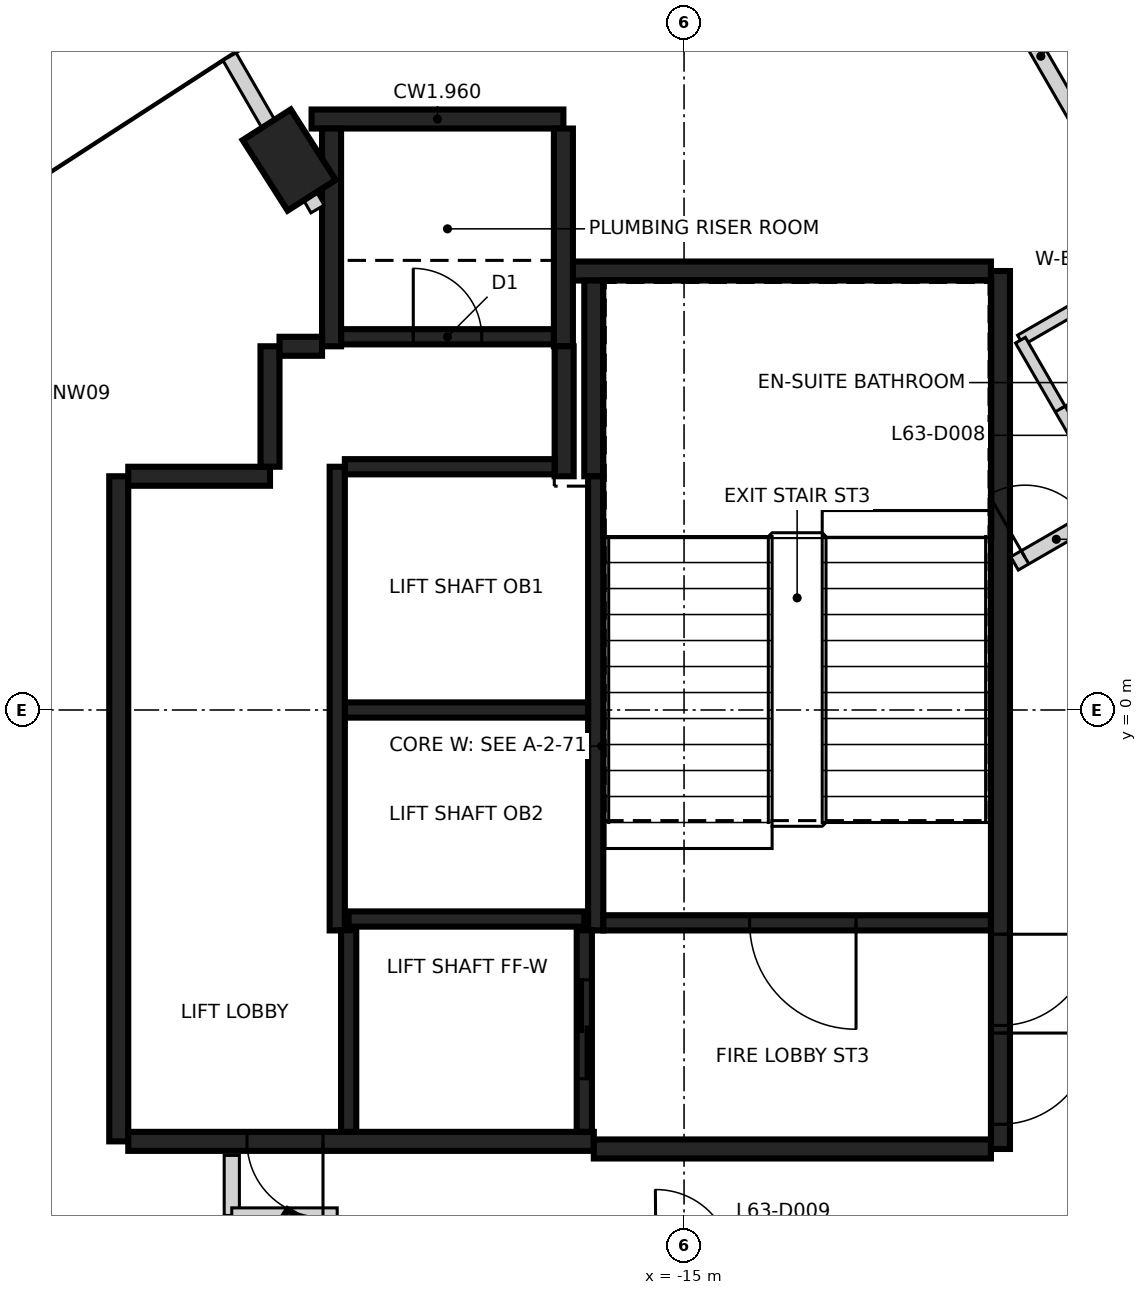
"""IFC4 building model, lengths in metres.
Left out: names, types, materials, properties, quantities, classifications, styles, units other than length and angle.
Written with IfcOpenShell. Run it as: python <this file> out.ifc"""

import sys

from ifc_helpers import new_model, si_unit, direction, frame, frame_2d, origin, origin_2d, place, context, subcontext, project, spatial, rectangle, extrude, element, fill, save


model = new_model("IFC4")
c1 = context("Model", 3, precision=1e-05, world=origin(), true_north=direction((0.0, 1.0)))
c2 = subcontext(c1, "Body", "Model", "MODEL_VIEW")
j1 = project(units=[si_unit("LENGTHUNIT", "METRE"), si_unit("PLANEANGLEUNIT", "RADIAN")], contexts=[c1])
p1 = place(None, origin())
s1 = spatial("IfcSite", under=j1, at=p1, CompositionType="ELEMENT")
p2 = place(p1, origin())
s2 = spatial("IfcBuilding", under=s1, at=p2, CompositionType="ELEMENT")
p3 = place(p2, frame((0.0, 0.0, 250.2)))
s3 = spatial("IfcBuildingStorey", under=s2, at=p3, CompositionType="ELEMENT", Elevation=250.2)
for number, where, z_axis, x_axis in (
    (1, (-20.195, 7.235, -0.35), (0.0, 0.0, 1.0), (-0.538, 0.843, 0.0)),
    (2, (-20.195, -7.235, -0.35), (0.0, 0.0, 1.0), (0.538, 0.843, 0.0)),
):
    element("IfcColumn", number, at=place(p3, frame(where, z_axis=z_axis, x_axis=x_axis)), inside=s3, PredefinedType="COLUMN", context=c2, shape_type="SweptSolid", body=[
        extrude(rectangle(XDim=1.1, YDim=0.75, at=origin_2d()), origin(), (0.0, 0.0, 1.0), 3.6),
    ])
p4 = place(p3, frame((-10.837, 5.775, 0.0), z_axis=(0.0, 0.0, 1.0), x_axis=(0.0, -1.0, 0.0)))
e3 = element("IfcWall", 3, at=p4, inside=s3, PredefinedType="SHEAR", context=c2, shape_type="SweptSolid", body=[
    extrude(rectangle(XDim=11.55, YDim=0.25, at=frame_2d((5.775, 0.0))), origin(), (0.0, 0.0, 1.0), 3.25),
])
p5 = place(p4, frame((10.025, 0.0, 0.0)))
e4 = element("IfcOpeningElement", 4, at=p5, cuts=e3, PredefinedType="OPENING", context=c2, shape_type="SweptSolid", body=[
    extrude(rectangle(XDim=1.2, YDim=2.1, at=frame_2d((0.6, 1.05))), frame((0.0, 0.135, 0.0), z_axis=(0.0, -1.0, 0.0), x_axis=(1.0, 0.0, 0.0)), (0.0, 0.0, 1.0), 0.27),
])
p6 = place(p4, frame((8.725, 0.0, 0.0)))
e5 = element("IfcOpeningElement", 5, at=p6, cuts=e3, PredefinedType="OPENING", context=c2, shape_type="SweptSolid", body=[
    extrude(rectangle(XDim=1.2, YDim=2.1, at=frame_2d((0.6, 1.05))), frame((0.0, 0.135, 0.0), z_axis=(0.0, -1.0, 0.0), x_axis=(1.0, 0.0, 0.0)), (0.0, 0.0, 1.0), 0.27),
])
p7 = place(p3, frame((-22.437, -5.675, 0.0), z_axis=(0.0, 0.0, 1.0), x_axis=(0.0, 1.0, 0.0)))
e6 = element("IfcWall", 6, at=p7, inside=s3, PredefinedType="SHEAR", context=c2, shape_type="SweptSolid", body=[
    extrude(rectangle(XDim=8.75, YDim=0.25, at=frame_2d((4.375, 0.0))), origin(), (0.0, 0.0, 1.0), 3.25),
])
p8 = place(p3, frame((-16.187, -5.675, 0.0), z_axis=(0.0, 0.0, 1.0), x_axis=(-1.0, 0.0, 0.0)))
e7 = element("IfcWall", 7, at=p8, inside=s3, PredefinedType="SHEAR", context=c2, shape_type="SweptSolid", body=[
    extrude(rectangle(XDim=6.125, YDim=0.25, at=frame_2d((3.062, 0.0))), origin(), (0.0, 0.0, 1.0), 3.25),
])
p9 = place(p8, frame((3.563, 0.0, 0.0)))
e8 = element("IfcOpeningElement", 8, at=p9, cuts=e7, PredefinedType="OPENING", context=c2, shape_type="SweptSolid", body=[
    extrude(rectangle(XDim=1.0, YDim=2.1, at=frame_2d((0.5, 1.05))), frame((0.0, 0.135, 0.0), z_axis=(0.0, -1.0, 0.0), x_axis=(1.0, 0.0, 0.0)), (0.0, 0.0, 1.0), 0.27),
])
p10 = place(p3, frame((-10.963, -5.775, 0.0), z_axis=(0.0, 0.0, 1.0), x_axis=(-1.0, 0.0, 0.0)))
e9 = element("IfcWall", 9, at=p10, inside=s3, PredefinedType="SHEAR", context=c2, shape_type="SweptSolid", body=[
    extrude(rectangle(XDim=5.225, YDim=0.25, at=frame_2d((2.612, 0.0))), origin(), (0.0, 0.0, 1.0), 3.25),
])
p11 = place(p3, frame((-16.472, 5.775, 0.0), z_axis=(0.0, 0.0, 1.0), x_axis=(1.0, 0.0, 0.0)))
e10 = element("IfcWall", 10, at=p11, inside=s3, PredefinedType="SHEAR", context=c2, shape_type="SweptSolid", body=[
    extrude(rectangle(XDim=5.51, YDim=0.25, at=frame_2d((2.755, 0.0))), origin(), (0.0, 0.0, 1.0), 3.25),
])
p12 = place(p3, frame((-19.9, 7.775, 0.0), z_axis=(0.0, 0.0, 1.0), x_axis=(1.0, 0.0, 0.0)))
e11 = element("IfcWall", 11, at=p12, inside=s3, PredefinedType="SHEAR", context=c2, shape_type="SweptSolid", body=[
    extrude(rectangle(XDim=3.313, YDim=0.25, at=frame_2d((1.656, 0.0))), origin(), (0.0, 0.0, 1.0), 3.25),
])
for number, where, z_axis, x_axis in (
    (12, (-16.587, 7.65, 0.0), (0.0, 0.0, 1.0), (0.0, -1.0, 0.0)),
    (13, (-19.637, 4.785, 0.0), (0.0, 0.0, 1.0), (0.0, 1.0, 0.0)),
):
    element("IfcWall", number, at=place(p3, frame(where, z_axis=z_axis, x_axis=x_axis)), inside=s3, PredefinedType="SHEAR", context=c2, shape_type="SweptSolid", body=[
        extrude(rectangle(XDim=2.865, YDim=0.25, at=frame_2d((1.432, 0.0))), origin(), (0.0, 0.0, 1.0), 3.25),
    ])
p13 = place(p3, frame((-16.187, 3.075, 0.0), z_axis=(0.0, 0.0, 1.0), x_axis=(0.0, 1.0, 0.0)))
e14 = element("IfcWall", 14, at=p13, inside=s3, PredefinedType="SHEAR", context=c2, shape_type="SweptSolid", body=[
    extrude(rectangle(XDim=2.575, YDim=0.25, at=frame_2d((1.287, 0.0))), origin(), (0.0, 0.0, 1.0), 3.25),
])
p14 = place(p3, frame((-22.312, 3.075, 0.0), z_axis=(0.0, 0.0, 1.0), x_axis=(1.0, 0.0, 0.0)))
e15 = element("IfcWall", 15, at=p14, inside=s3, PredefinedType="SHEAR", context=c2, shape_type="SweptSolid", body=[
    extrude(rectangle(XDim=1.865, YDim=0.25, at=frame_2d((0.932, 0.0))), origin(), (0.0, 0.0, 1.0), 3.25),
])
p15 = place(p3, frame((-16.577, 4.785, 0.0), z_axis=(0.0, 0.0, 1.0), x_axis=(0.0, -1.0, 0.0)))
e16 = element("IfcWall", 16, at=p15, inside=s3, PredefinedType="SHEAR", context=c2, shape_type="SweptSolid", body=[
    extrude(rectangle(XDim=1.71, YDim=0.25, at=frame_2d((0.855, 0.0))), origin(), (0.0, 0.0, 1.0), 3.25),
])
p16 = place(p3, frame((-20.447, 3.2, 0.0), z_axis=(0.0, 0.0, 1.0), x_axis=(0.0, 1.0, 0.0)))
e17 = element("IfcWall", 17, at=p16, inside=s3, PredefinedType="SHEAR", context=c2, shape_type="SweptSolid", body=[
    extrude(rectangle(XDim=1.584, YDim=0.25, at=frame_2d((0.792, 0.0))), origin(), (0.0, 0.0, 1.0), 3.25),
])
p17 = place(p3, frame((-20.322, 4.785, 0.0), z_axis=(0.0, 0.0, 1.0), x_axis=(1.0, 0.0, 0.0)))
e18 = element("IfcWall", 18, at=p17, inside=s3, PredefinedType="SHEAR", context=c2, shape_type="SweptSolid", body=[
    extrude(rectangle(XDim=0.559, YDim=0.25, at=frame_2d((0.28, 0.0))), origin(), (0.0, 0.0, 1.0), 3.25),
])
p18 = place(p3, frame((-16.162, 3.074, 0.0), z_axis=(0.0, 0.0, 1.0), x_axis=(0.0, -1.0, 0.0)))
e19 = element("IfcWall", 19, at=p18, inside=s3, PredefinedType="SHEAR", context=c2, shape_type="SweptSolid", body=[
    extrude(rectangle(XDim=5.974, YDim=0.2, at=frame_2d((2.987, 0.0))), origin(), (0.0, 0.0, 1.0), 3.25),
])
p19 = place(p3, frame((-19.562, -2.9, 0.0), z_axis=(0.0, 0.0, 1.0), x_axis=(0.0, 1.0, 0.0)))
e20 = element("IfcWall", 20, at=p19, inside=s3, PredefinedType="SHEAR", context=c2, shape_type="SweptSolid", body=[
    extrude(rectangle(XDim=6.1, YDim=0.2, at=frame_2d((3.05, 0.0))), origin(), (0.0, 0.0, 1.0), 3.25),
])
p20 = place(p3, frame((-10.963, -2.8, 0.0), z_axis=(0.0, 0.0, 1.0), x_axis=(-1.0, 0.0, 0.0)))
e21 = element("IfcWall", 21, at=p20, inside=s3, PredefinedType="SHEAR", context=c2, shape_type="SweptSolid", body=[
    extrude(rectangle(XDim=5.098, YDim=0.2, at=frame_2d((2.549, 0.0))), origin(), (0.0, 0.0, 1.0), 3.25),
])
p21 = place(p20, frame((1.774, 0.0, 0.0)))
e22 = element("IfcOpeningElement", 22, at=p21, cuts=e21, PredefinedType="OPENING", context=c2, shape_type="SweptSolid", body=[
    extrude(rectangle(XDim=1.4, YDim=2.1, at=frame_2d((0.7, 1.05))), frame((0.0, 0.11, 0.0), z_axis=(0.0, -1.0, 0.0), x_axis=(1.0, 0.0, 0.0)), (0.0, 0.0, 1.0), 0.22),
])
p22 = place(p3, frame((-16.263, 0.0, 0.0), z_axis=(0.0, 0.0, 1.0), x_axis=(-1.0, 0.0, 0.0)))
e23 = element("IfcWall", 23, at=p22, inside=s3, PredefinedType="SHEAR", context=c2, shape_type="SweptSolid", body=[
    extrude(rectangle(XDim=3.198, YDim=0.2, at=frame_2d((1.599, 0.0))), origin(), (0.0, 0.0, 1.0), 3.25),
])
p23 = place(p3, frame((-19.511, 4.91, 0.0), z_axis=(0.0, 0.0, 1.0), x_axis=(1.0, 0.0, 0.0)))
e24 = element("IfcWall", 24, at=p23, inside=s3, PredefinedType="SHEAR", context=c2, shape_type="SweptSolid", body=[
    extrude(rectangle(XDim=2.798, YDim=0.2, at=frame_2d((1.399, 0.0))), origin(), (0.0, 0.0, 1.0), 3.25),
])
p24 = place(p23, frame((0.949, 0.0, 0.0)))
e25 = element("IfcOpeningElement", 25, at=p24, cuts=e24, PredefinedType="OPENING", context=c2, shape_type="SweptSolid", body=[
    extrude(rectangle(XDim=0.9, YDim=2.1, at=frame_2d((0.45, 1.05))), frame((0.0, 0.11, 0.0), z_axis=(0.0, -1.0, 0.0), x_axis=(1.0, 0.0, 0.0)), (0.0, 0.0, 1.0), 0.22),
])
p25 = place(p3, frame((-19.462, 3.2, 0.0), z_axis=(0.0, 0.0, 1.0), x_axis=(1.0, 0.0, 0.0)))
e26 = element("IfcWall", 26, at=p25, inside=s3, PredefinedType="SHEAR", context=c2, shape_type="SweptSolid", body=[
    extrude(rectangle(XDim=2.759, YDim=0.2, at=frame_2d((1.379, 0.0))), origin(), (0.0, 0.0, 1.0), 3.25),
])
p26 = place(p3, frame((-19.412, -2.75, 0.0), z_axis=(0.0, 0.0, 1.0), x_axis=(1.0, 0.0, 0.0)))
e27 = element("IfcWall", 27, at=p26, inside=s3, PredefinedType="SHEAR", context=c2, shape_type="SweptSolid", body=[
    extrude(rectangle(XDim=3.1, YDim=0.2, at=frame_2d((1.55, 0.0))), origin(), (0.0, 0.0, 1.0), 3.25),
])
p27 = place(p3, frame((-16.312, -2.898, 0.0), z_axis=(0.0, 0.0, 1.0), x_axis=(0.0, -1.0, 0.0)))
e28 = element("IfcWall", 28, at=p27, inside=s3, PredefinedType="SHEAR", context=c2, shape_type="SweptSolid", body=[
    extrude(rectangle(XDim=2.651, YDim=0.2, at=frame_2d((1.325, 0.0))), origin(), (0.0, 0.0, 1.0), 3.25),
])
p28 = place(p27, frame((0.652, 0.0, 0.0)))
e29 = element("IfcOpeningElement", 29, at=p28, cuts=e28, PredefinedType="OPENING", context=c2, shape_type="SweptSolid", body=[
    extrude(rectangle(XDim=1.3, YDim=2.1, at=frame_2d((0.65, 1.05))), frame((0.0, 0.11, 0.0), z_axis=(0.0, -1.0, 0.0), x_axis=(1.0, 0.0, 0.0)), (0.0, 0.0, 1.0), 0.22),
])
p29 = place(p3, frame((-19.412, -5.549, 0.0), z_axis=(0.0, 0.0, 1.0), x_axis=(0.0, 1.0, 0.0)))
e30 = element("IfcWall", 30, at=p29, inside=s3, PredefinedType="SHEAR", context=c2, shape_type="SweptSolid", body=[
    extrude(rectangle(XDim=2.651, YDim=0.2, at=frame_2d((1.325, 0.0))), origin(), (0.0, 0.0, 1.0), 3.25),
])
p30 = place(p3, frame((-20.95, -6.65, 0.0), z_axis=(0.0, 0.0, 1.0), x_axis=(0.0, 1.0, 0.0)))
e31 = element("IfcWall", 31, at=p30, inside=s3, PredefinedType="PARTITIONING", context=c2, shape_type="SweptSolid", body=[
    extrude(rectangle(XDim=0.79, YDim=0.2, at=frame_2d((0.395, 0.0))), origin(), (0.0, 0.0, 1.0), 2.35),
])
p31 = place(p3, frame((-20.95, -6.65, 0.0), z_axis=(0.0, 0.0, 1.0), x_axis=(1.0, 0.0, 0.0)))
e32 = element("IfcWall", 32, at=p31, inside=s3, PredefinedType="PARTITIONING", context=c2, shape_type="SweptSolid", body=[
    extrude(rectangle(XDim=1.387, YDim=0.2, at=frame_2d((0.693, 0.0))), origin(), (0.0, 0.0, 1.0), 2.35),
])
p32 = place(p3, frame((-10.652, 1.928, 0.0), z_axis=(0.0, 0.0, 1.0), x_axis=(0.865793573301, 0.500401327367, 0.0)))
e33 = element("IfcWall", 33, at=p32, inside=s3, PredefinedType="PARTITIONING", context=c2, shape_type="SweptSolid", body=[
    extrude(rectangle(XDim=12.886, YDim=0.2, at=frame_2d((6.443, 0.0))), origin(), (0.0, 0.0, 1.0), 3.25),
])
p33 = place(p32, frame((7.123, 0.0, 0.0)))
e34 = element("IfcOpeningElement", 34, at=p33, cuts=e33, PredefinedType="OPENING", context=c2, shape_type="SweptSolid", body=[
    extrude(rectangle(XDim=0.95, YDim=2.1, at=frame_2d((0.475, 1.05))), frame((0.0, 0.11, 0.0), z_axis=(0.0, -1.0, 0.0), x_axis=(1.0, 0.0, 0.0)), (0.0, 0.0, 1.0), 0.22),
])
p34 = place(p32, frame((0.16, 0.0, 0.0)))
e35 = element("IfcOpeningElement", 35, at=p34, cuts=e33, PredefinedType="OPENING", context=c2, shape_type="SweptSolid", body=[
    extrude(rectangle(XDim=0.95, YDim=2.1, at=frame_2d((0.475, 1.05))), frame((0.0, 0.11, 0.0), z_axis=(0.0, -1.0, 0.0), x_axis=(1.0, 0.0, 0.0)), (0.0, 0.0, 1.0), 0.22),
])
p35 = place(p3, frame((-20.979, 8.595, 0.0), z_axis=(0.0, 0.0, 1.0), x_axis=(0.499950711303, -0.866053858757, 0.0)))
e36 = element("IfcWall", 36, at=p35, inside=s3, PredefinedType="PARTITIONING", context=c2, shape_type="SweptSolid", body=[
    extrude(rectangle(XDim=2.315, YDim=0.2, at=frame_2d((1.157, 0.0))), origin(), (0.0, 0.0, 1.0), 3.25),
])
p36 = place(p3, frame((-13.107, 13.453, 0.0), z_axis=(0.0, 0.0, 1.0), x_axis=(0.50003870279, -0.866003057565, 0.0)))
e37 = element("IfcWall", 37, at=p36, inside=s3, PredefinedType="PARTITIONING", context=c2, shape_type="SweptSolid", body=[
    extrude(rectangle(XDim=11.204, YDim=0.2, at=frame_2d((5.602, 0.0))), origin(), (0.0, 0.0, 1.0), 3.25),
])
p37 = place(p3, frame((-13.107, -13.453, 0.0), z_axis=(0.0, 0.0, 1.0), x_axis=(0.500058218288, 0.865991788831, 0.0)))
e38 = element("IfcWall", 38, at=p37, inside=s3, PredefinedType="PARTITIONING", context=c2, shape_type="SweptSolid", body=[
    extrude(rectangle(XDim=9.735, YDim=0.2, at=frame_2d((4.867, 0.0))), origin(), (0.0, 0.0, 1.0), 3.25),
])
p38 = place(p3, frame((-10.574, 4.866, 0.0), z_axis=(0.0, 0.0, 1.0), x_axis=(0.866052994476, 0.499952208475, 0.0)))
e39 = element("IfcWall", 39, at=p38, inside=s3, PredefinedType="PARTITIONING", context=c2, shape_type="SweptSolid", body=[
    extrude(rectangle(XDim=4.201, YDim=0.15, at=frame_2d((2.1, 0.0))), origin(), (0.0, 0.0, 1.0), 3.25),
])
p39 = place(p3, frame((-10.574, 4.865, 0.0), z_axis=(0.0, 0.0, 1.0), x_axis=(0.500004234368, -0.866022959057, 0.0)))
e40 = element("IfcWall", 40, at=p39, inside=s3, PredefinedType="PARTITIONING", context=c2, shape_type="SweptSolid", body=[
    extrude(rectangle(XDim=2.5, YDim=0.15, at=frame_2d((1.25, 0.0))), origin(), (0.0, 0.0, 1.0), 3.25),
])
p40 = place(p39, frame((1.045, 0.0, 0.0)))
e41 = element("IfcOpeningElement", 41, at=p40, cuts=e40, PredefinedType="OPENING", context=c2, shape_type="SweptSolid", body=[
    extrude(rectangle(XDim=0.8, YDim=2.1, at=frame_2d((0.4, 1.05))), frame((0.0, 0.085, 0.0), z_axis=(0.0, -1.0, 0.0), x_axis=(1.0, 0.0, 0.0)), (0.0, 0.0, 1.0), 0.17),
])
p41 = place(p28, origin())
e42 = element("IfcDoor", 42, at=p41, inside=s3, OperationType="SLIDING_TO_RIGHT", PredefinedType="DOOR", context=c2, shape_type="SweptSolid", body=[
    extrude(rectangle(XDim=1.3, YDim=2.1, at=frame_2d((0.65, 1.05))), frame((0.0, 0.025, 0.0), z_axis=(0.0, -1.0, 0.0), x_axis=(1.0, 0.0, 0.0)), (0.0, 0.0, 1.0), 0.05),
])
fill(e29, e42)
p42 = place(p9, origin())
e43 = element("IfcDoor", 43, at=p42, inside=s3, OperationType="SINGLE_SWING_LEFT", PredefinedType="DOOR", context=c2, shape_type="SweptSolid", body=[
    extrude(rectangle(XDim=1.0, YDim=2.1, at=frame_2d((0.5, 1.05))), frame((0.0, 0.025, 0.0), z_axis=(0.0, -1.0, 0.0), x_axis=(1.0, 0.0, 0.0)), (0.0, 0.0, 1.0), 0.05),
])
fill(e8, e43)
p43 = place(p5, origin())
e44 = element("IfcDoor", 44, at=p43, inside=s3, OperationType="SINGLE_SWING_LEFT", PredefinedType="DOOR", context=c2, shape_type="SweptSolid", body=[
    extrude(rectangle(XDim=1.2, YDim=2.1, at=frame_2d((0.6, 1.05))), frame((0.0, 0.025, 0.0), z_axis=(0.0, -1.0, 0.0), x_axis=(1.0, 0.0, 0.0)), (0.0, 0.0, 1.0), 0.05),
])
fill(e4, e44)
p44 = place(p6, origin())
e45 = element("IfcDoor", 45, at=p44, inside=s3, OperationType="SINGLE_SWING_RIGHT", PredefinedType="DOOR", context=c2, shape_type="SweptSolid", body=[
    extrude(rectangle(XDim=1.2, YDim=2.1, at=frame_2d((0.6, 1.05))), frame((0.0, 0.025, 0.0), z_axis=(0.0, -1.0, 0.0), x_axis=(1.0, 0.0, 0.0)), (0.0, 0.0, 1.0), 0.05),
])
fill(e5, e45)
p45 = place(p21, origin())
e46 = element("IfcDoor", 46, at=p45, inside=s3, OperationType="SINGLE_SWING_RIGHT", PredefinedType="DOOR", context=c2, shape_type="SweptSolid", body=[
    extrude(rectangle(XDim=1.4, YDim=2.1, at=frame_2d((0.7, 1.05))), frame((0.0, 0.025, 0.0), z_axis=(0.0, -1.0, 0.0), x_axis=(1.0, 0.0, 0.0)), (0.0, 0.0, 1.0), 0.05),
])
fill(e22, e46)
p46 = place(p24, origin())
e47 = element("IfcDoor", 47, at=p46, inside=s3, OperationType="SINGLE_SWING_LEFT", PredefinedType="DOOR", context=c2, shape_type="SweptSolid", body=[
    extrude(rectangle(XDim=0.9, YDim=2.1, at=frame_2d((0.45, 1.05))), frame((0.0, 0.025, 0.0), z_axis=(0.0, -1.0, 0.0), x_axis=(1.0, 0.0, 0.0)), (0.0, 0.0, 1.0), 0.05),
])
fill(e25, e47)
p47 = place(p34, origin())
e48 = element("IfcDoor", 48, at=p47, inside=s3, OperationType="SINGLE_SWING_LEFT", PredefinedType="DOOR", context=c2, shape_type="SweptSolid", body=[
    extrude(rectangle(XDim=0.95, YDim=2.1, at=frame_2d((0.475, 1.05))), frame((0.0, 0.025, 0.0), z_axis=(0.0, -1.0, 0.0), x_axis=(1.0, 0.0, 0.0)), (0.0, 0.0, 1.0), 0.05),
])
fill(e35, e48)
p48 = place(p40, frame((0.8, 0.0, 0.0), z_axis=(0.0, 0.0, 1.0), x_axis=(-1.0, 0.0, 0.0)))
e49 = element("IfcDoor", 49, at=p48, inside=s3, OperationType="SINGLE_SWING_LEFT", PredefinedType="DOOR", context=c2, shape_type="SweptSolid", body=[
    extrude(rectangle(XDim=0.8, YDim=2.1, at=frame_2d((0.4, 1.05))), frame((0.0, 0.025, 0.0), z_axis=(0.0, -1.0, 0.0), x_axis=(1.0, 0.0, 0.0)), (0.0, 0.0, 1.0), 0.05),
])
fill(e41, e49)
save(model, sys.argv[1])
